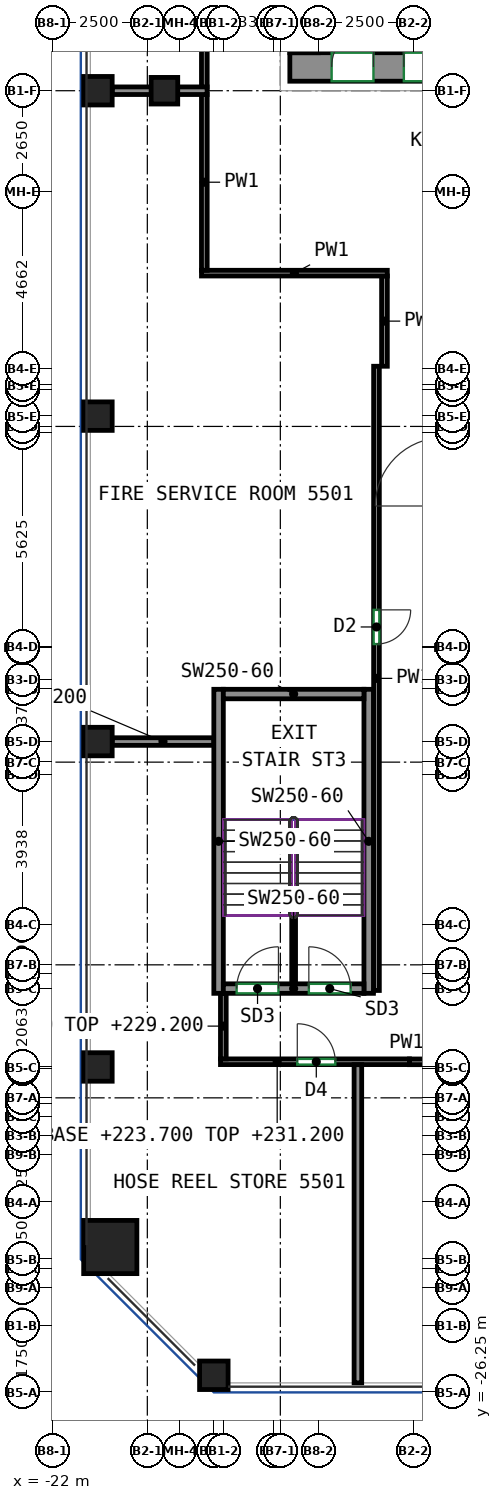
"""IFC4 building model, lengths in metres.
Left out: names, types, materials, properties, quantities, classifications, styles, units other than length and angle.
Written with IfcOpenShell. Run it as: python <this file> out.ifc"""

import sys

from ifc_helpers import new_model, si_unit, direction, frame, frame_2d, origin, origin_2d, place, context, subcontext, project, spatial, rectangle, extrude, source, transform, mapped, element, fill, save


model = new_model("IFC4")
c1 = context("Model", 3, precision=1e-05, world=origin(), true_north=direction((0.0, 1.0)))
c2 = subcontext(c1, "Body", "Model", "MODEL_VIEW")
j1 = project(units=[si_unit("LENGTHUNIT", "METRE"), si_unit("PLANEANGLEUNIT", "RADIAN")], contexts=[c1])
p1 = place(None, origin())
s1 = spatial("IfcSite", under=j1, at=p1, CompositionType="ELEMENT")
p2 = place(p1, origin())
s2 = spatial("IfcBuilding", under=s1, at=p2, CompositionType="ELEMENT")
p3 = place(p2, frame((0.0, 0.0, 223.7)))
s3 = spatial("IfcBuildingStorey", under=s2, at=p3, CompositionType="ELEMENT", Elevation=223.7)
m1 = source(origin(), c2, "Body", "SweptSolid", [
    extrude(rectangle(XDim=1.4, YDim=1.4, at=origin_2d()), origin(), (0.0, 0.0, 1.0), 5.5),
])
p4 = place(p3, frame((-20.475, -22.425, 0.0), z_axis=(0.0, 0.0, 1.0), x_axis=(1.0, 0.0, 0.0)))
e1 = element("IfcColumn", 1, at=p4, inside=s3, PredefinedType="COLUMN", context=c2, shape_type="MappedRepresentation", body=[
    mapped(m1, transform((0.0, 0.0, 0.0))),
])
m2 = source(origin(), c2, "Body", "SweptSolid", [
    extrude(rectangle(XDim=0.75, YDim=0.75, at=origin_2d()), origin(), (0.0, 0.0, 1.0), 5.5),
])
for number, where, z_axis, x_axis in (
    (2, (-20.8, -17.688, 0.0), (0.0, 0.0, 1.0), (1.0, 0.0, 0.0)),
    (3, (-20.8, -9.125, 0.0), (0.0, 0.0, 1.0), (1.0, 0.0, 0.0)),
    (4, (-20.8, -0.562, 0.0), (0.0, 0.0, 1.0), (1.0, 0.0, 0.0)),
    (5, (-20.8, 8.0, 0.0), (0.0, 0.0, 1.0), (1.0, 0.0, 0.0)),
    (6, (-17.75, -25.8, 0.0), (0.0, 0.0, 1.0), (1.0, 0.0, 0.0)),
):
    element("IfcColumn", number, at=place(p3, frame(where, z_axis=z_axis, x_axis=x_axis)), inside=s3, PredefinedType="COLUMN", context=c2, shape_type="MappedRepresentation", body=[
        mapped(m2, transform((0.0, 0.0, 0.0))),
    ])
m3 = source(origin(), c2, "Body", "SweptSolid", [
    extrude(rectangle(XDim=0.7, YDim=0.7, at=origin_2d()), origin(), (0.0, 0.0, 1.0), 9.5),
])
p5 = place(p3, frame((-19.05, 8.0, 0.0), z_axis=(0.0, 0.0, 1.0), x_axis=(1.0, 0.0, 0.0)))
e7 = element("IfcColumn", 7, at=p5, inside=s3, PredefinedType="COLUMN", context=c2, shape_type="MappedRepresentation", body=[
    mapped(m3, transform((0.0, 0.0, 0.0))),
])
m4 = source(origin(), c2, "Body", "SweptSolid", [
    extrude(rectangle(XDim=5.38, YDim=0.75, at=frame_2d((2.69, 0.0))), origin(), (0.0, 0.0, 1.0), 9.5),
])
p6 = place(p3, frame((-15.75, 8.625, 0.0), z_axis=(0.0, 0.0, 1.0), x_axis=(1.0, 0.0, 0.0)))
e8 = element("IfcWall", 8, at=p6, inside=s3, PredefinedType="SHEAR", context=c2, shape_type="MappedRepresentation", body=[
    mapped(m4, transform((0.0, 0.0, 0.0))),
])
p7 = place(p6, frame((1.1, 0.0, 0.0)))
e9 = element("IfcOpeningElement", 9, at=p7, cuts=e8, PredefinedType="OPENING", context=c2, shape_type="SweptSolid", body=[
    extrude(rectangle(XDim=1.1, YDim=2.1, at=frame_2d((0.55, 1.05))), frame((0.0, 0.385, 0.0), z_axis=(0.0, -1.0, 0.0), x_axis=(1.0, 0.0, 0.0)), (0.0, 0.0, 1.0), 0.77),
])
p8 = place(p6, frame((3.0, 0.0, 0.0)))
e10 = element("IfcOpeningElement", 10, at=p8, cuts=e8, PredefinedType="OPENING", context=c2, shape_type="SweptSolid", body=[
    extrude(rectangle(XDim=1.1, YDim=2.1, at=frame_2d((0.55, 1.05))), frame((0.0, 0.385, 0.0), z_axis=(0.0, -1.0, 0.0), x_axis=(1.0, 0.0, 0.0)), (0.0, 0.0, 1.0), 0.77),
])
m5 = source(origin(), c2, "Body", "SweptSolid", [
    extrude(rectangle(XDim=8.0, YDim=0.25, at=frame_2d((4.0, 0.0))), origin(), (0.0, 0.0, 1.0), 9.5),
])
for number, where, z_axis, x_axis in (
    (11, (-17.625, -15.75, 0.0), (0.0, 0.0, 1.0), (0.0, 1.0, 0.0)),
    (12, (-13.675, -15.75, 0.0), (0.0, 0.0, 1.0), (0.0, 1.0, 0.0)),
):
    element("IfcWall", number, at=place(p3, frame(where, z_axis=z_axis, x_axis=x_axis)), inside=s3, PredefinedType="SHEAR", context=c2, shape_type="MappedRepresentation", body=[
        mapped(m5, transform((0.0, 0.0, 0.0))),
    ])
m6 = source(origin(), c2, "Body", "SweptSolid", [
    extrude(rectangle(XDim=3.7, YDim=0.25, at=frame_2d((1.85, 0.0))), origin(), (0.0, 0.0, 1.0), 9.5),
])
p9 = place(p3, frame((-17.5, -15.625, 0.0), z_axis=(0.0, 0.0, 1.0), x_axis=(1.0, 0.0, 0.0)))
e13 = element("IfcWall", 13, at=p9, inside=s3, PredefinedType="SHEAR", context=c2, shape_type="MappedRepresentation", body=[
    mapped(m6, transform((0.0, 0.0, 0.0))),
])
p10 = place(p9, frame((0.35, 0.0, 0.0)))
e14 = element("IfcOpeningElement", 14, at=p10, cuts=e13, PredefinedType="OPENING", context=c2, shape_type="SweptSolid", body=[
    extrude(rectangle(XDim=1.1, YDim=2.1, at=frame_2d((0.55, 1.05))), frame((0.0, 0.135, 0.0), z_axis=(0.0, -1.0, 0.0), x_axis=(1.0, 0.0, 0.0)), (0.0, 0.0, 1.0), 0.27),
])
p11 = place(p9, frame((2.25, 0.0, 0.0)))
e15 = element("IfcOpeningElement", 15, at=p11, cuts=e13, PredefinedType="OPENING", context=c2, shape_type="SweptSolid", body=[
    extrude(rectangle(XDim=1.1, YDim=2.1, at=frame_2d((0.55, 1.05))), frame((0.0, 0.135, 0.0), z_axis=(0.0, -1.0, 0.0), x_axis=(1.0, 0.0, 0.0)), (0.0, 0.0, 1.0), 0.27),
])
p12 = place(p3, frame((-17.5, -7.875, 0.0), z_axis=(0.0, 0.0, 1.0), x_axis=(1.0, 0.0, 0.0)))
e16 = element("IfcWall", 16, at=p12, inside=s3, PredefinedType="SHEAR", context=c2, shape_type="MappedRepresentation", body=[
    mapped(m6, transform((0.0, 0.0, 0.0))),
])
m7 = source(origin(), c2, "Body", "SweptSolid", [
    extrude(rectangle(XDim=1.8, YDim=0.1, at=frame_2d((0.9, 0.0))), origin(), (0.0, 0.0, 1.0), 3.1),
])
for number, where, z_axis, x_axis in (
    (17, (-13.15, 9.0, 0.0), (0.0, 0.0, 1.0), (0.0, 1.0, 0.0)),
    (18, (-15.65, -15.5, 0.0), (0.0, 0.0, 1.0), (0.0, 1.0, 0.0)),
):
    element("IfcWall", number, at=place(p3, frame(where, z_axis=z_axis, x_axis=x_axis)), inside=s3, PredefinedType="PARTITIONING", context=c2, shape_type="MappedRepresentation", body=[
        mapped(m7, transform((0.0, 0.0, 0.0))),
    ])
p13 = place(p3, frame((-13.47, 0.75, 0.0), z_axis=(0.0, 0.0, 1.0), x_axis=(0.0, -1.0, 0.0)))
e19 = element("IfcWall", 19, at=p13, inside=s3, PredefinedType="PARTITIONING", context=c2, shape_type="SweptSolid", body=[
    extrude(rectangle(XDim=16.425, YDim=0.15, at=frame_2d((8.212, 0.0))), origin(), (0.0, 0.0, 1.0), 9.5),
])
p14 = place(p13, frame((6.41, 0.0, 0.0)))
e20 = element("IfcOpeningElement", 20, at=p14, cuts=e19, PredefinedType="OPENING", context=c2, shape_type="SweptSolid", body=[
    extrude(rectangle(XDim=0.9, YDim=2.1, at=frame_2d((0.45, 1.05))), frame((0.0, 0.085, 0.0), z_axis=(0.0, -1.0, 0.0), x_axis=(1.0, 0.0, 0.0)), (0.0, 0.0, 1.0), 0.17),
])
p15 = place(p3, frame((-13.26, 3.125, 0.0), z_axis=(0.0, 0.0, 1.0), x_axis=(0.0, -1.0, 0.0)))
e21 = element("IfcWall", 21, at=p15, inside=s3, PredefinedType="PARTITIONING", context=c2, shape_type="SweptSolid", body=[
    extrude(rectangle(XDim=2.375, YDim=0.15, at=frame_2d((1.188, 0.0))), origin(), (0.0, 0.0, 1.0), 9.5),
])
p16 = place(p3, frame((-18.075, 3.2, 0.0), z_axis=(0.0, 0.0, 1.0), x_axis=(1.0, 0.0, 0.0)))
e22 = element("IfcWall", 22, at=p16, inside=s3, PredefinedType="PARTITIONING", context=c2, shape_type="SweptSolid", body=[
    extrude(rectangle(XDim=4.89, YDim=0.15, at=frame_2d((2.445, 0.0))), origin(), (0.0, 0.0, 1.0), 9.5),
])
p17 = place(p3, frame((-18.0, 3.275, 0.0), z_axis=(0.0, 0.0, 1.0), x_axis=(0.0, 1.0, 0.0)))
e23 = element("IfcWall", 23, at=p17, inside=s3, PredefinedType="PARTITIONING", context=c2, shape_type="SweptSolid", body=[
    extrude(rectangle(XDim=4.635, YDim=0.15, at=frame_2d((2.317, 0.0))), origin(), (0.0, 0.0, 1.0), 9.5),
])
p18 = place(p3, frame((-12.602, -17.552, 0.0), z_axis=(0.0, 0.0, 1.0), x_axis=(1.0, 0.0, 0.0)))
e24 = element("IfcWall", 24, at=p18, inside=s3, PredefinedType="PARTITIONING", context=c2, shape_type="SweptSolid", body=[
    extrude(rectangle(XDim=0.979, YDim=0.15, at=frame_2d((0.49, 0.0))), origin(), (0.0, 0.0, 1.0), 7.5),
])
p19 = place(p3, frame((-17.575, -17.55, 0.0), z_axis=(0.0, 0.0, 1.0), x_axis=(1.0, 0.0, 0.0)))
e25 = element("IfcWall", 25, at=p19, inside=s3, PredefinedType="PARTITIONING", context=c2, shape_type="SweptSolid", body=[
    extrude(rectangle(XDim=4.973, YDim=0.15, at=frame_2d((2.486, 0.0))), origin(), (0.0, 0.0, 1.0), 7.5),
])
p20 = place(p19, frame((2.021, 0.0, 0.0)))
e26 = element("IfcOpeningElement", 26, at=p20, cuts=e25, PredefinedType="OPENING", context=c2, shape_type="SweptSolid", body=[
    extrude(rectangle(XDim=1.0, YDim=2.1, at=frame_2d((0.5, 1.05))), frame((0.0, 0.085, 0.0), z_axis=(0.0, -1.0, 0.0), x_axis=(1.0, 0.0, 0.0)), (0.0, 0.0, 1.0), 0.17),
])
p21 = place(p3, frame((-17.5, -15.75, 0.0), z_axis=(0.0, 0.0, 1.0), x_axis=(0.0, -1.0, 0.0)))
e27 = element("IfcWall", 27, at=p21, inside=s3, PredefinedType="PARTITIONING", context=c2, shape_type="SweptSolid", body=[
    extrude(rectangle(XDim=1.725, YDim=0.15, at=frame_2d((0.863, 0.0))), origin(), (0.0, 0.0, 1.0), 5.5),
])
p22 = place(p3, frame((-18.0, 8.09, 0.0), z_axis=(0.0, 0.0, 1.0), x_axis=(0.0, 1.0, 0.0)))
e28 = element("IfcWall", 28, at=p22, inside=s3, PredefinedType="PARTITIONING", context=c2, shape_type="SweptSolid", body=[
    extrude(rectangle(XDim=15.835, YDim=0.15, at=frame_2d((7.917, 0.0))), origin(), (0.0, 0.0, 1.0), 9.5),
])
p23 = place(p3, frame((-20.425, -9.125, 0.0), z_axis=(0.0, 0.0, 1.0), x_axis=(1.0, 0.0, 0.0)))
e29 = element("IfcWall", 29, at=p23, inside=s3, PredefinedType="PARTITIONING", context=c2, shape_type="SweptSolid", body=[
    extrude(rectangle(XDim=2.675, YDim=0.2, at=frame_2d((1.337, 0.0))), origin(), (0.0, 0.0, 1.0), 7.5),
])
p24 = place(p3, frame((-20.425, 8.0, 0.0), z_axis=(0.0, 0.0, 1.0), x_axis=(1.0, 0.0, 0.0)))
e30 = element("IfcWall", 30, at=p24, inside=s3, PredefinedType="PARTITIONING", context=c2, shape_type="SweptSolid", body=[
    extrude(rectangle(XDim=2.498, YDim=0.2, at=frame_2d((1.249, 0.0))), origin(), (0.0, 0.0, 1.0), 9.5),
])
p25 = place(p3, frame((-13.959, -17.627, 0.0), z_axis=(0.0, 0.0, 1.0), x_axis=(0.0, -1.0, 0.0)))
e31 = element("IfcWall", 31, at=p25, inside=s3, PredefinedType="PARTITIONING", context=c2, shape_type="SweptSolid", body=[
    extrude(rectangle(XDim=8.373, YDim=0.2, at=frame_2d((4.187, 0.0))), origin(), (0.0, 0.0, 1.0), 9.5),
])
p26 = place(p7, origin())
e32 = element("IfcDoor", 32, at=p26, inside=s3, OperationType="SINGLE_SWING_RIGHT", PredefinedType="DOOR", context=c2, shape_type="SweptSolid", body=[
    extrude(rectangle(XDim=1.1, YDim=2.1, at=frame_2d((0.55, 1.05))), frame((0.0, 0.28, 0.0), z_axis=(0.0, -1.0, 0.0), x_axis=(1.0, 0.0, 0.0)), (0.0, 0.0, 1.0), 0.05),
])
fill(e9, e32)
p27 = place(p8, origin())
e33 = element("IfcDoor", 33, at=p27, inside=s3, OperationType="SINGLE_SWING_LEFT", PredefinedType="DOOR", context=c2, shape_type="SweptSolid", body=[
    extrude(rectangle(XDim=1.1, YDim=2.1, at=frame_2d((0.55, 1.05))), frame((0.0, 0.28, 0.0), z_axis=(0.0, -1.0, 0.0), x_axis=(1.0, 0.0, 0.0)), (0.0, 0.0, 1.0), 0.05),
])
fill(e10, e33)
p28 = place(p10, origin())
e34 = element("IfcDoor", 34, at=p28, inside=s3, OperationType="SINGLE_SWING_RIGHT", PredefinedType="DOOR", context=c2, shape_type="SweptSolid", body=[
    extrude(rectangle(XDim=1.1, YDim=2.1, at=frame_2d((0.55, 1.05))), frame((0.0, 0.025, 0.0), z_axis=(0.0, -1.0, 0.0), x_axis=(1.0, 0.0, 0.0)), (0.0, 0.0, 1.0), 0.05),
])
fill(e14, e34)
p29 = place(p11, origin())
e35 = element("IfcDoor", 35, at=p29, inside=s3, OperationType="SINGLE_SWING_LEFT", PredefinedType="DOOR", context=c2, shape_type="SweptSolid", body=[
    extrude(rectangle(XDim=1.1, YDim=2.1, at=frame_2d((0.55, 1.05))), frame((0.0, 0.025, 0.0), z_axis=(0.0, -1.0, 0.0), x_axis=(1.0, 0.0, 0.0)), (0.0, 0.0, 1.0), 0.05),
])
fill(e15, e35)
p30 = place(p20, origin())
e36 = element("IfcDoor", 36, at=p30, inside=s3, OperationType="SINGLE_SWING_LEFT", PredefinedType="DOOR", context=c2, shape_type="SweptSolid", body=[
    extrude(rectangle(XDim=1.0, YDim=2.1, at=frame_2d((0.5, 1.05))), frame((0.0, 0.025, 0.0), z_axis=(0.0, -1.0, 0.0), x_axis=(1.0, 0.0, 0.0)), (0.0, 0.0, 1.0), 0.05),
])
fill(e26, e36)
p31 = place(p14, origin())
e37 = element("IfcDoor", 37, at=p31, inside=s3, OperationType="SINGLE_SWING_LEFT", PredefinedType="DOOR", context=c2, shape_type="SweptSolid", body=[
    extrude(rectangle(XDim=0.9, YDim=2.1, at=frame_2d((0.45, 1.05))), frame((0.0, 0.025, 0.0), z_axis=(0.0, -1.0, 0.0), x_axis=(1.0, 0.0, 0.0)), (0.0, 0.0, 1.0), 0.05),
])
fill(e20, e37)
save(model, sys.argv[1])
